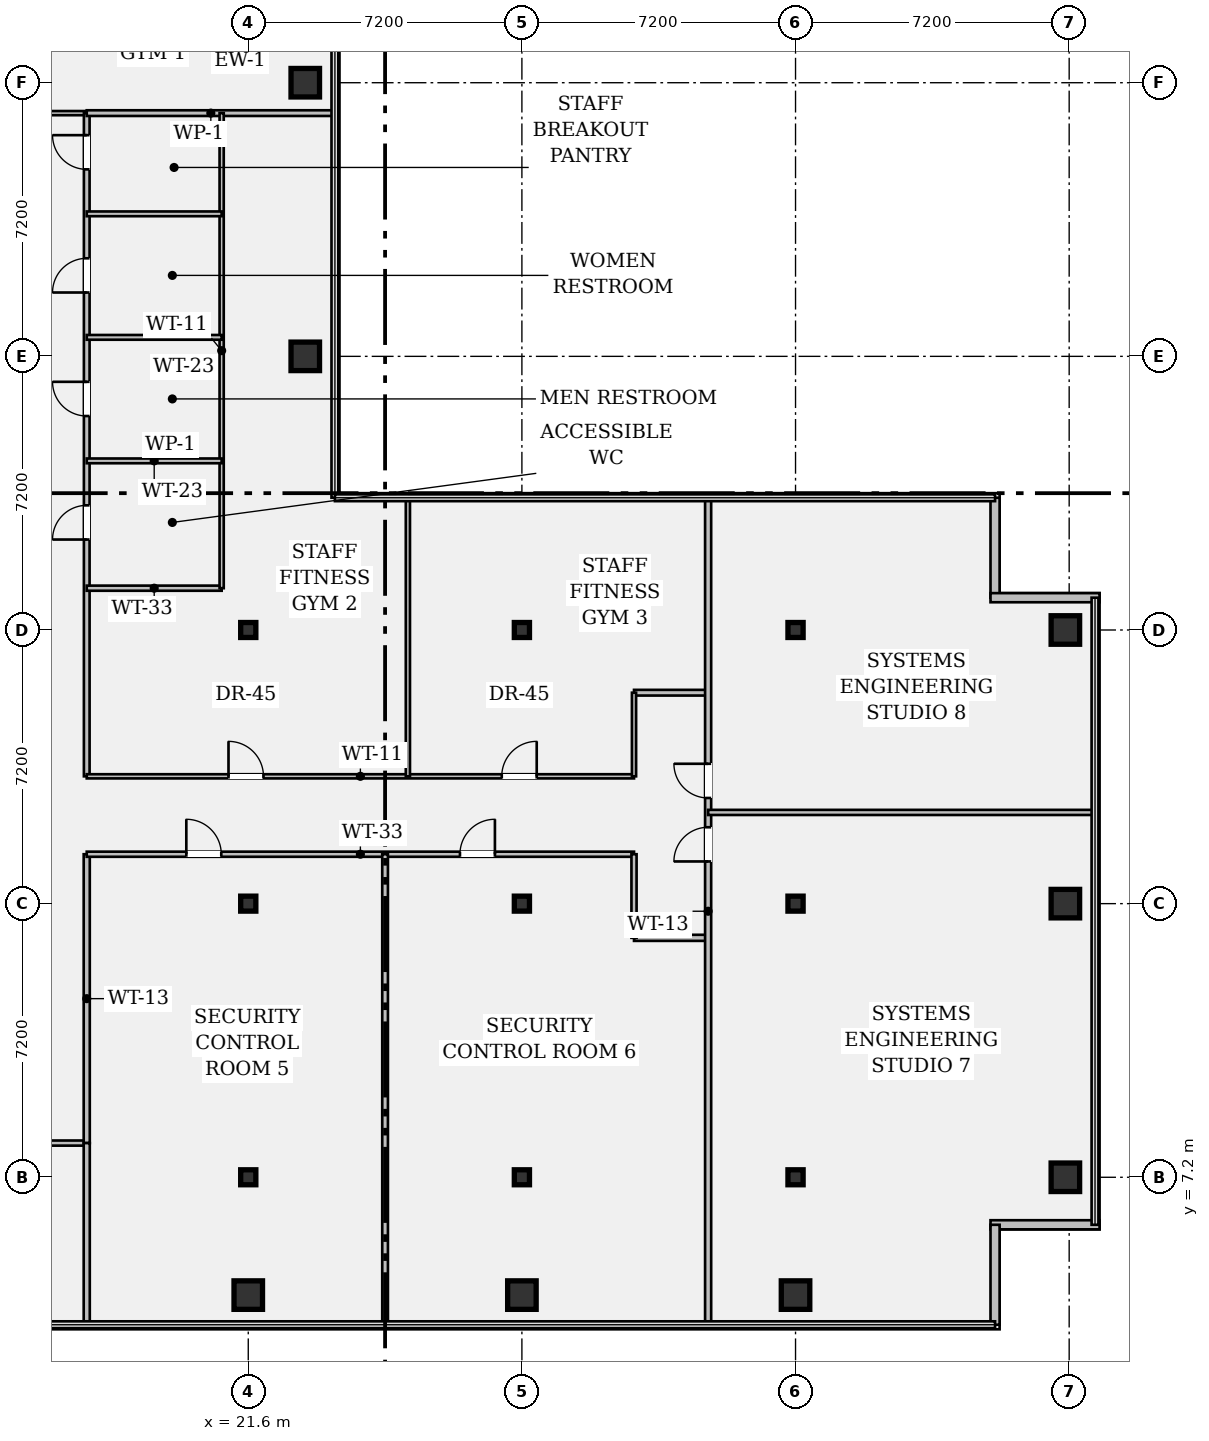
"""IFC4 building model, lengths in metres.
Left out: names, types, materials, properties, quantities, classifications, styles, units other than length and angle.
Written with IfcOpenShell. Run it as: python <this file> out.ifc"""

import sys

from ifc_helpers import new_model, si_unit, direction, frame, frame_2d, origin, origin_2d, place, context, subcontext, project, spatial, rectangle, hollow_rectangle, i_section, extrude, element, fill, save


model = new_model("IFC4")
c1 = context("Model", 3, precision=1e-05, world=origin(), true_north=direction((0.0, 1.0)))
c2 = subcontext(c1, "Body", "Model", "MODEL_VIEW")
j1 = project(units=[si_unit("LENGTHUNIT", "METRE"), si_unit("PLANEANGLEUNIT", "RADIAN")], contexts=[c1])
p1 = place(None, origin())
s1 = spatial("IfcSite", under=j1, at=p1, CompositionType="ELEMENT")
p2 = place(p1, origin())
s2 = spatial("IfcBuilding", under=s1, at=p2, CompositionType="ELEMENT")
p3 = place(p2, frame((0.0, 0.0, 215.25)))
s3 = spatial("IfcBuildingStorey", under=s2, at=p3, CompositionType="ELEMENT", Elevation=215.25)
p4 = place(p3, frame((21.6, 4.1, 0.0), z_axis=(0.0, 0.0, 1.0), x_axis=(1.0, 0.0, 0.0)))
e1 = element("IfcColumn", 1, at=p4, inside=s3, PredefinedType="COLUMN", context=c2, shape_type="SweptSolid", body=[
    extrude(hollow_rectangle(XDim=0.75, YDim=0.75, WallThickness=0.045, at=origin_2d()), origin(), (0.0, 0.0, 1.0), 3.24),
])
for number, where, z_axis, x_axis in (
    (2, (21.6, 7.2, 0.0), (0.0, 0.0, 1.0), (1.0, 0.0, 0.0)),
    (3, (21.6, 14.4, 0.0), (0.0, 0.0, 1.0), (1.0, 0.0, 0.0)),
    (4, (21.6, 21.6, 0.0), (0.0, 0.0, 1.0), (1.0, 0.0, 0.0)),
):
    element("IfcColumn", number, at=place(p3, frame(where, z_axis=z_axis, x_axis=x_axis)), inside=s3, PredefinedType="COLUMN", context=c2, shape_type="SweptSolid", body=[
        extrude(i_section(OverallWidth=0.399, OverallDepth=0.394, WebThickness=0.023, FlangeThickness=0.037, FilletRadius=0.018, at=origin_2d()), origin(), (0.0, 0.0, 1.0), 3.24),
    ])
for number, where, z_axis, x_axis in (
    (5, (23.1, 28.8, 0.0), (0.0, 0.0, 1.0), (1.0, 0.0, 0.0)),
    (6, (23.1, 36.0, 0.0), (0.0, 0.0, 1.0), (1.0, 0.0, 0.0)),
    (7, (28.8, 4.1, 0.0), (0.0, 0.0, 1.0), (1.0, 0.0, 0.0)),
):
    element("IfcColumn", number, at=place(p3, frame(where, z_axis=z_axis, x_axis=x_axis)), inside=s3, PredefinedType="COLUMN", context=c2, shape_type="SweptSolid", body=[
        extrude(hollow_rectangle(XDim=0.75, YDim=0.75, WallThickness=0.045, at=origin_2d()), origin(), (0.0, 0.0, 1.0), 3.24),
    ])
for number, where, z_axis, x_axis in (
    (8, (28.8, 7.2, 0.0), (0.0, 0.0, 1.0), (1.0, 0.0, 0.0)),
    (9, (28.8, 14.4, 0.0), (0.0, 0.0, 1.0), (1.0, 0.0, 0.0)),
    (10, (28.8, 21.6, 0.0), (0.0, 0.0, 1.0), (1.0, 0.0, 0.0)),
):
    element("IfcColumn", number, at=place(p3, frame(where, z_axis=z_axis, x_axis=x_axis)), inside=s3, PredefinedType="COLUMN", context=c2, shape_type="SweptSolid", body=[
        extrude(i_section(OverallWidth=0.399, OverallDepth=0.394, WebThickness=0.023, FlangeThickness=0.037, FilletRadius=0.018, at=origin_2d()), origin(), (0.0, 0.0, 1.0), 3.24),
    ])
p5 = place(p3, frame((36.0, 4.1, 0.0), z_axis=(0.0, 0.0, 1.0), x_axis=(1.0, 0.0, 0.0)))
e11 = element("IfcColumn", 11, at=p5, inside=s3, PredefinedType="COLUMN", context=c2, shape_type="SweptSolid", body=[
    extrude(hollow_rectangle(XDim=0.75, YDim=0.75, WallThickness=0.045, at=origin_2d()), origin(), (0.0, 0.0, 1.0), 3.24),
])
for number, where, z_axis, x_axis in (
    (12, (36.0, 7.2, 0.0), (0.0, 0.0, 1.0), (1.0, 0.0, 0.0)),
    (13, (36.0, 14.4, 0.0), (0.0, 0.0, 1.0), (1.0, 0.0, 0.0)),
    (14, (36.0, 21.6, 0.0), (0.0, 0.0, 1.0), (1.0, 0.0, 0.0)),
):
    element("IfcColumn", number, at=place(p3, frame(where, z_axis=z_axis, x_axis=x_axis)), inside=s3, PredefinedType="COLUMN", context=c2, shape_type="SweptSolid", body=[
        extrude(i_section(OverallWidth=0.399, OverallDepth=0.394, WebThickness=0.023, FlangeThickness=0.037, FilletRadius=0.018, at=origin_2d()), origin(), (0.0, 0.0, 1.0), 3.24),
    ])
for number, where, z_axis, x_axis in (
    (15, (43.1, 7.2, 0.0), (0.0, 0.0, 1.0), (1.0, 0.0, 0.0)),
    (16, (43.1, 14.4, 0.0), (0.0, 0.0, 1.0), (1.0, 0.0, 0.0)),
    (17, (43.1, 21.6, 0.0), (0.0, 0.0, 1.0), (1.0, 0.0, 0.0)),
):
    element("IfcColumn", number, at=place(p3, frame(where, z_axis=z_axis, x_axis=x_axis)), inside=s3, PredefinedType="COLUMN", context=c2, shape_type="SweptSolid", body=[
        extrude(hollow_rectangle(XDim=0.75, YDim=0.75, WallThickness=0.045, at=origin_2d()), origin(), (0.0, 0.0, 1.0), 3.24),
    ])
p6 = place(p3, frame((41.25, 25.08, 0.0), z_axis=(0.0, 0.0, 1.0), x_axis=(0.0, -1.0, 0.0)))
e18 = element("IfcWall", 18, at=p6, inside=s3, PredefinedType="STANDARD", context=c2, shape_type="SweptSolid", body=[
    extrude(rectangle(XDim=2.63, YDim=0.24, at=frame_2d((1.315, 0.0))), origin(), (0.0, 0.0, 1.0), 3.24),
])
for number, where, z_axis, x_axis in (
    (19, (41.13, 22.45, 0.0), (0.0, 0.0, 1.0), (1.0, 0.0, 0.0)),
    (20, (44.0, 5.95, 0.0), (0.0, 0.0, 1.0), (-1.0, 0.0, 0.0)),
):
    element("IfcWall", number, at=place(p3, frame(where, z_axis=z_axis, x_axis=x_axis)), inside=s3, PredefinedType="STANDARD", context=c2, shape_type="SweptSolid", body=[
        extrude(rectangle(XDim=2.87, YDim=0.24, at=frame_2d((1.435, 0.0))), origin(), (0.0, 0.0, 1.0), 3.24),
    ])
p7 = place(p3, frame((41.25, 5.95, 0.0), z_axis=(0.0, 0.0, 1.0), x_axis=(0.0, -1.0, 0.0)))
e21 = element("IfcWall", 21, at=p7, inside=s3, PredefinedType="STANDARD", context=c2, shape_type="SweptSolid", body=[
    extrude(rectangle(XDim=2.63, YDim=0.24, at=frame_2d((1.315, 0.0))), origin(), (0.0, 0.0, 1.0), 3.24),
])
p8 = place(p3, frame((14.4, 8.1, 0.0), z_axis=(0.0, 0.0, 1.0), x_axis=(1.0, 0.0, 0.0)))
e22 = element("IfcWall", 22, at=p8, inside=s3, PredefinedType="PARTITIONING", context=c2, shape_type="SweptSolid", body=[
    extrude(rectangle(XDim=2.95, YDim=0.135, at=frame_2d((1.475, 0.0))), origin(), (0.0, 0.0, 1.0), 2.808),
])
p9 = place(p8, frame((0.95, 0.0, 0.0)))
e23 = element("IfcOpeningElement", 23, at=p9, cuts=e22, PredefinedType="OPENING", context=c2, shape_type="SweptSolid", body=[
    extrude(rectangle(XDim=0.92, YDim=2.15, at=frame_2d((0.46, 1.075))), frame((0.0, 0.08, 0.0), z_axis=(0.0, -1.0, 0.0), x_axis=(1.0, 0.0, 0.0)), (0.0, 0.0, 1.0), 0.159),
])
p10 = place(p3, frame((14.4, 35.2, 0.0), z_axis=(0.0, 0.0, 1.0), x_axis=(1.0, 0.0, 0.0)))
e24 = element("IfcWall", 24, at=p10, inside=s3, PredefinedType="PARTITIONING", context=c2, shape_type="SweptSolid", body=[
    extrude(rectangle(XDim=2.95, YDim=0.11, at=frame_2d((1.475, 0.0))), origin(), (0.0, 0.0, 1.0), 2.808),
])
p11 = place(p10, frame((0.95, 0.0, 0.0)))
e25 = element("IfcOpeningElement", 25, at=p11, cuts=e24, PredefinedType="OPENING", context=c2, shape_type="SweptSolid", body=[
    extrude(rectangle(XDim=1.0, YDim=2.15, at=frame_2d((0.5, 1.075))), frame((0.0, 0.067, 0.0), z_axis=(0.0, -1.0, 0.0), x_axis=(1.0, 0.0, 0.0)), (0.0, 0.0, 1.0), 0.134),
])
p12 = place(p3, frame((17.35, 8.1, 0.0), z_axis=(0.0, 0.0, 1.0), x_axis=(0.0, 1.0, 0.0)))
e26 = element("IfcWall", 26, at=p12, inside=s3, PredefinedType="PARTITIONING", context=c2, shape_type="SweptSolid", body=[
    extrude(rectangle(XDim=7.6, YDim=0.16, at=frame_2d((3.8, 0.0))), origin(), (0.0, 0.0, 1.0), 2.613),
])
p13 = place(p3, frame((17.35, 17.75, 0.0), z_axis=(0.0, 0.0, 1.0), x_axis=(0.0, 1.0, 0.0)))
e27 = element("IfcWall", 27, at=p13, inside=s3, PredefinedType="PARTITIONING", context=c2, shape_type="SweptSolid", body=[
    extrude(rectangle(XDim=17.45, YDim=0.15, at=frame_2d((8.725, 0.0))), origin(), (0.0, 0.0, 1.0), 2.613),
])
p14 = place(p13, frame((6.23, 0.0, 0.0)))
e28 = element("IfcOpeningElement", 28, at=p14, cuts=e27, PredefinedType="OPENING", context=c2, shape_type="SweptSolid", body=[
    extrude(rectangle(XDim=0.9, YDim=2.15, at=frame_2d((0.45, 1.075))), frame((0.0, 0.087, 0.0), z_axis=(0.0, -1.0, 0.0), x_axis=(1.0, 0.0, 0.0)), (0.0, 0.0, 1.0), 0.174),
])
p15 = place(p13, frame((9.48, 0.0, 0.0)))
e29 = element("IfcOpeningElement", 29, at=p15, cuts=e27, PredefinedType="OPENING", context=c2, shape_type="SweptSolid", body=[
    extrude(rectangle(XDim=0.9, YDim=2.15, at=frame_2d((0.45, 1.075))), frame((0.0, 0.087, 0.0), z_axis=(0.0, -1.0, 0.0), x_axis=(1.0, 0.0, 0.0)), (0.0, 0.0, 1.0), 0.174),
])
p16 = place(p13, frame((12.73, 0.0, 0.0)))
e30 = element("IfcOpeningElement", 30, at=p16, cuts=e27, PredefinedType="OPENING", context=c2, shape_type="SweptSolid", body=[
    extrude(rectangle(XDim=0.9, YDim=2.15, at=frame_2d((0.45, 1.075))), frame((0.0, 0.087, 0.0), z_axis=(0.0, -1.0, 0.0), x_axis=(1.0, 0.0, 0.0)), (0.0, 0.0, 1.0), 0.174),
])
p17 = place(p13, frame((15.97, 0.0, 0.0)))
e31 = element("IfcOpeningElement", 31, at=p17, cuts=e27, PredefinedType="OPENING", context=c2, shape_type="SweptSolid", body=[
    extrude(rectangle(XDim=0.9, YDim=2.15, at=frame_2d((0.45, 1.075))), frame((0.0, 0.087, 0.0), z_axis=(0.0, -1.0, 0.0), x_axis=(1.0, 0.0, 0.0)), (0.0, 0.0, 1.0), 0.174),
])
p18 = place(p3, frame((17.35, 15.7, 0.0), z_axis=(0.0, 0.0, 1.0), x_axis=(1.0, 0.0, 0.0)))
e32 = element("IfcWall", 32, at=p18, inside=s3, PredefinedType="PARTITIONING", context=c2, shape_type="SweptSolid", body=[
    extrude(rectangle(XDim=14.4, YDim=0.135, at=frame_2d((7.2, 0.0))), origin(), (0.0, 0.0, 1.0), 2.613),
])
p19 = place(p18, frame((2.62, 0.0, 0.0)))
e33 = element("IfcOpeningElement", 33, at=p19, cuts=e32, PredefinedType="OPENING", context=c2, shape_type="SweptSolid", body=[
    extrude(rectangle(XDim=0.92, YDim=2.15, at=frame_2d((0.46, 1.075))), frame((0.0, 0.08, 0.0), z_axis=(0.0, -1.0, 0.0), x_axis=(1.0, 0.0, 0.0)), (0.0, 0.0, 1.0), 0.159),
])
p20 = place(p18, frame((9.82, 0.0, 0.0)))
e34 = element("IfcOpeningElement", 34, at=p20, cuts=e32, PredefinedType="OPENING", context=c2, shape_type="SweptSolid", body=[
    extrude(rectangle(XDim=0.92, YDim=2.15, at=frame_2d((0.46, 1.075))), frame((0.0, 0.08, 0.0), z_axis=(0.0, -1.0, 0.0), x_axis=(1.0, 0.0, 0.0)), (0.0, 0.0, 1.0), 0.159),
])
p21 = place(p3, frame((17.35, 17.75, 0.0), z_axis=(0.0, 0.0, 1.0), x_axis=(1.0, 0.0, 0.0)))
e35 = element("IfcWall", 35, at=p21, inside=s3, PredefinedType="PARTITIONING", context=c2, shape_type="SweptSolid", body=[
    extrude(rectangle(XDim=14.4, YDim=0.11, at=frame_2d((7.2, 0.0))), origin(), (0.0, 0.0, 1.0), 2.613),
])
p22 = place(p21, frame((3.73, 0.0, 0.0)))
e36 = element("IfcOpeningElement", 36, at=p22, cuts=e35, PredefinedType="OPENING", context=c2, shape_type="SweptSolid", body=[
    extrude(rectangle(XDim=0.92, YDim=2.15, at=frame_2d((0.46, 1.075))), frame((0.0, 0.067, 0.0), z_axis=(0.0, -1.0, 0.0), x_axis=(1.0, 0.0, 0.0)), (0.0, 0.0, 1.0), 0.134),
])
p23 = place(p21, frame((10.92, 0.0, 0.0)))
e37 = element("IfcOpeningElement", 37, at=p23, cuts=e35, PredefinedType="OPENING", context=c2, shape_type="SweptSolid", body=[
    extrude(rectangle(XDim=0.92, YDim=2.15, at=frame_2d((0.46, 1.075))), frame((0.0, 0.067, 0.0), z_axis=(0.0, -1.0, 0.0), x_axis=(1.0, 0.0, 0.0)), (0.0, 0.0, 1.0), 0.134),
])
p24 = place(p3, frame((31.75, 13.5, 0.0), z_axis=(0.0, 0.0, 1.0), x_axis=(1.0, 0.0, 0.0)))
e38 = element("IfcWall", 38, at=p24, inside=s3, PredefinedType="PARTITIONING", context=c2, shape_type="SweptSolid", body=[
    extrude(rectangle(XDim=1.95, YDim=0.16, at=frame_2d((0.975, 0.0))), origin(), (0.0, 0.0, 1.0), 2.808),
])
p25 = place(p3, frame((31.75, 19.95, 0.0), z_axis=(0.0, 0.0, 1.0), x_axis=(1.0, 0.0, 0.0)))
e39 = element("IfcWall", 39, at=p25, inside=s3, PredefinedType="PARTITIONING", context=c2, shape_type="SweptSolid", body=[
    extrude(rectangle(XDim=1.95, YDim=0.15, at=frame_2d((0.975, 0.0))), origin(), (0.0, 0.0, 1.0), 2.808),
])
p26 = place(p3, frame((31.75, 13.5, 0.0), z_axis=(0.0, 0.0, 1.0), x_axis=(0.0, 1.0, 0.0)))
e40 = element("IfcWall", 40, at=p26, inside=s3, PredefinedType="PARTITIONING", context=c2, shape_type="SweptSolid", body=[
    extrude(rectangle(XDim=2.2, YDim=0.135, at=frame_2d((1.1, 0.0))), origin(), (0.0, 0.0, 1.0), 2.613),
])
p27 = place(p3, frame((31.75, 17.75, 0.0), z_axis=(0.0, 0.0, 1.0), x_axis=(0.0, 1.0, 0.0)))
e41 = element("IfcWall", 41, at=p27, inside=s3, PredefinedType="PARTITIONING", context=c2, shape_type="SweptSolid", body=[
    extrude(rectangle(XDim=2.2, YDim=0.11, at=frame_2d((1.1, 0.0))), origin(), (0.0, 0.0, 1.0), 3.24),
])
p28 = place(p3, frame((33.7, 3.32, 0.0), z_axis=(0.0, 0.0, 1.0), x_axis=(0.0, 1.0, 0.0)))
e42 = element("IfcWall", 42, at=p28, inside=s3, PredefinedType="PARTITIONING", context=c2, shape_type="SweptSolid", body=[
    extrude(rectangle(XDim=21.76, YDim=0.16, at=frame_2d((10.88, 0.0))), origin(), (0.0, 0.0, 1.0), 2.613),
])
p29 = place(p28, frame((12.19, 0.0, 0.0)))
e43 = element("IfcOpeningElement", 43, at=p29, cuts=e42, PredefinedType="OPENING", context=c2, shape_type="SweptSolid", body=[
    extrude(rectangle(XDim=0.9, YDim=2.15, at=frame_2d((0.45, 1.075))), frame((0.0, 0.092, 0.0), z_axis=(0.0, -1.0, 0.0), x_axis=(1.0, 0.0, 0.0)), (0.0, 0.0, 1.0), 0.184),
])
p30 = place(p28, frame((13.86, 0.0, 0.0)))
e44 = element("IfcOpeningElement", 44, at=p30, cuts=e42, PredefinedType="OPENING", context=c2, shape_type="SweptSolid", body=[
    extrude(rectangle(XDim=0.9, YDim=2.15, at=frame_2d((0.45, 1.075))), frame((0.0, 0.092, 0.0), z_axis=(0.0, -1.0, 0.0), x_axis=(1.0, 0.0, 0.0)), (0.0, 0.0, 1.0), 0.184),
])
p31 = place(p3, frame((17.35, 35.2, 0.0), z_axis=(0.0, 0.0, 1.0), x_axis=(1.0, 0.0, 0.0)))
e45 = element("IfcWall", 45, at=p31, inside=s3, PredefinedType="PARTITIONING", context=c2, shape_type="SweptSolid", body=[
    extrude(rectangle(XDim=6.53, YDim=0.15, at=frame_2d((3.265, 0.0))), origin(), (0.0, 0.0, 1.0), 2.808),
])
p32 = place(p3, frame((17.35, 22.7, 0.0), z_axis=(0.0, 0.0, 1.0), x_axis=(1.0, 0.0, 0.0)))
e46 = element("IfcWall", 46, at=p32, inside=s3, PredefinedType="PARTITIONING", context=c2, shape_type="SweptSolid", body=[
    extrude(rectangle(XDim=3.55, YDim=0.135, at=frame_2d((1.775, 0.0))), origin(), (0.0, 0.0, 1.0), 2.808),
])
p33 = place(p3, frame((20.9, 22.7, 0.0), z_axis=(0.0, 0.0, 1.0), x_axis=(0.0, 1.0, 0.0)))
e47 = element("IfcWall", 47, at=p33, inside=s3, PredefinedType="PARTITIONING", context=c2, shape_type="SweptSolid", body=[
    extrude(rectangle(XDim=12.5, YDim=0.11, at=frame_2d((6.25, 0.0))), origin(), (0.0, 0.0, 1.0), 2.613),
])
for number, where, z_axis, x_axis in (
    (48, (17.35, 26.05, 0.0), (0.0, 0.0, 1.0), (1.0, 0.0, 0.0)),
    (49, (17.35, 29.3, 0.0), (0.0, 0.0, 1.0), (1.0, 0.0, 0.0)),
    (50, (17.35, 32.55, 0.0), (0.0, 0.0, 1.0), (1.0, 0.0, 0.0)),
):
    element("IfcWall", number, at=place(p3, frame(where, z_axis=z_axis, x_axis=x_axis)), inside=s3, PredefinedType="PARTITIONING", context=c2, shape_type="SweptSolid", body=[
        extrude(rectangle(XDim=3.55, YDim=0.125, at=frame_2d((1.775, 0.0))), origin(), (0.0, 0.0, 1.0), 2.808),
    ])
p34 = place(p3, frame((25.8, 17.75, 0.0), z_axis=(0.0, 0.0, 1.0), x_axis=(0.0, 1.0, 0.0)))
e51 = element("IfcWall", 51, at=p34, inside=s3, PredefinedType="PARTITIONING", context=c2, shape_type="SweptSolid", body=[
    extrude(rectangle(XDim=7.3, YDim=0.11, at=frame_2d((3.65, 0.0))), origin(), (0.0, 0.0, 1.0), 2.613),
])
p35 = place(p3, frame((17.35, 3.32, 0.0), z_axis=(0.0, 0.0, 1.0), x_axis=(0.0, 1.0, 0.0)))
e52 = element("IfcWall", 52, at=p35, inside=s3, PredefinedType="PARTITIONING", context=c2, shape_type="SweptSolid", body=[
    extrude(rectangle(XDim=4.78, YDim=0.16, at=frame_2d((2.39, 0.0))), origin(), (0.0, 0.0, 1.0), 2.613),
])
p36 = place(p3, frame((25.2, 3.32, 0.0), z_axis=(0.0, 0.0, 1.0), x_axis=(0.0, 1.0, 0.0)))
e53 = element("IfcWall", 53, at=p36, inside=s3, PredefinedType="PARTITIONING", context=c2, shape_type="SweptSolid", body=[
    extrude(rectangle(XDim=12.38, YDim=0.15, at=frame_2d((6.19, 0.0))), origin(), (0.0, 0.0, 1.0), 2.613),
])
p37 = place(p3, frame((33.7, 16.8, 0.0), z_axis=(0.0, 0.0, 1.0), x_axis=(1.0, 0.0, 0.0)))
e54 = element("IfcWall", 54, at=p37, inside=s3, PredefinedType="PARTITIONING", context=c2, shape_type="SweptSolid", body=[
    extrude(rectangle(XDim=10.18, YDim=0.135, at=frame_2d((5.09, 0.0))), origin(), (0.0, 0.0, 1.0), 2.613),
])
p38 = place(p14, origin())
e55 = element("IfcDoor", 55, at=p38, inside=s3, OperationType="SINGLE_SWING_LEFT", PredefinedType="DOOR", context=c2, shape_type="SweptSolid", body=[
    extrude(rectangle(XDim=0.9, YDim=2.15, at=frame_2d((0.45, 1.075))), frame((0.0, 0.025, 0.0), z_axis=(0.0, -1.0, 0.0), x_axis=(1.0, 0.0, 0.0)), (0.0, 0.0, 1.0), 0.05),
])
fill(e28, e55)
p39 = place(p15, origin())
e56 = element("IfcDoor", 56, at=p39, inside=s3, OperationType="SINGLE_SWING_RIGHT", PredefinedType="DOOR", context=c2, shape_type="SweptSolid", body=[
    extrude(rectangle(XDim=0.9, YDim=2.15, at=frame_2d((0.45, 1.075))), frame((0.0, 0.025, 0.0), z_axis=(0.0, -1.0, 0.0), x_axis=(1.0, 0.0, 0.0)), (0.0, 0.0, 1.0), 0.05),
])
fill(e29, e56)
p40 = place(p16, origin())
e57 = element("IfcDoor", 57, at=p40, inside=s3, OperationType="SINGLE_SWING_LEFT", PredefinedType="DOOR", context=c2, shape_type="SweptSolid", body=[
    extrude(rectangle(XDim=0.9, YDim=2.15, at=frame_2d((0.45, 1.075))), frame((0.0, 0.025, 0.0), z_axis=(0.0, -1.0, 0.0), x_axis=(1.0, 0.0, 0.0)), (0.0, 0.0, 1.0), 0.05),
])
fill(e30, e57)
p41 = place(p17, origin())
e58 = element("IfcDoor", 58, at=p41, inside=s3, OperationType="SINGLE_SWING_RIGHT", PredefinedType="DOOR", context=c2, shape_type="SweptSolid", body=[
    extrude(rectangle(XDim=0.9, YDim=2.15, at=frame_2d((0.45, 1.075))), frame((0.0, 0.025, 0.0), z_axis=(0.0, -1.0, 0.0), x_axis=(1.0, 0.0, 0.0)), (0.0, 0.0, 1.0), 0.05),
])
fill(e31, e58)
p42 = place(p22, origin())
e59 = element("IfcDoor", 59, at=p42, inside=s3, OperationType="SINGLE_SWING_LEFT", PredefinedType="DOOR", context=c2, shape_type="SweptSolid", body=[
    extrude(rectangle(XDim=0.92, YDim=2.15, at=frame_2d((0.46, 1.075))), frame((0.0, 0.025, 0.0), z_axis=(0.0, -1.0, 0.0), x_axis=(1.0, 0.0, 0.0)), (0.0, 0.0, 1.0), 0.05),
])
fill(e36, e59)
p43 = place(p23, origin())
e60 = element("IfcDoor", 60, at=p43, inside=s3, OperationType="SINGLE_SWING_RIGHT", PredefinedType="DOOR", context=c2, shape_type="SweptSolid", body=[
    extrude(rectangle(XDim=0.92, YDim=2.15, at=frame_2d((0.46, 1.075))), frame((0.0, 0.025, 0.0), z_axis=(0.0, -1.0, 0.0), x_axis=(1.0, 0.0, 0.0)), (0.0, 0.0, 1.0), 0.05),
])
fill(e37, e60)
p44 = place(p19, origin())
e61 = element("IfcDoor", 61, at=p44, inside=s3, OperationType="SINGLE_SWING_LEFT", PredefinedType="DOOR", context=c2, shape_type="SweptSolid", body=[
    extrude(rectangle(XDim=0.92, YDim=2.15, at=frame_2d((0.46, 1.075))), frame((0.0, 0.025, 0.0), z_axis=(0.0, -1.0, 0.0), x_axis=(1.0, 0.0, 0.0)), (0.0, 0.0, 1.0), 0.05),
])
fill(e33, e61)
p45 = place(p20, origin())
e62 = element("IfcDoor", 62, at=p45, inside=s3, OperationType="SINGLE_SWING_RIGHT", PredefinedType="DOOR", context=c2, shape_type="SweptSolid", body=[
    extrude(rectangle(XDim=0.92, YDim=2.15, at=frame_2d((0.46, 1.075))), frame((0.0, 0.025, 0.0), z_axis=(0.0, -1.0, 0.0), x_axis=(1.0, 0.0, 0.0)), (0.0, 0.0, 1.0), 0.05),
])
fill(e34, e62)
p46 = place(p29, origin())
e63 = element("IfcDoor", 63, at=p46, inside=s3, OperationType="SINGLE_SWING_LEFT", PredefinedType="DOOR", context=c2, shape_type="SweptSolid", body=[
    extrude(rectangle(XDim=0.9, YDim=2.15, at=frame_2d((0.45, 1.075))), frame((0.0, 0.025, 0.0), z_axis=(0.0, -1.0, 0.0), x_axis=(1.0, 0.0, 0.0)), (0.0, 0.0, 1.0), 0.05),
])
fill(e43, e63)
p47 = place(p30, origin())
e64 = element("IfcDoor", 64, at=p47, inside=s3, OperationType="SINGLE_SWING_RIGHT", PredefinedType="DOOR", context=c2, shape_type="SweptSolid", body=[
    extrude(rectangle(XDim=0.9, YDim=2.15, at=frame_2d((0.45, 1.075))), frame((0.0, 0.025, 0.0), z_axis=(0.0, -1.0, 0.0), x_axis=(1.0, 0.0, 0.0)), (0.0, 0.0, 1.0), 0.05),
])
fill(e44, e64)
save(model, sys.argv[1])
